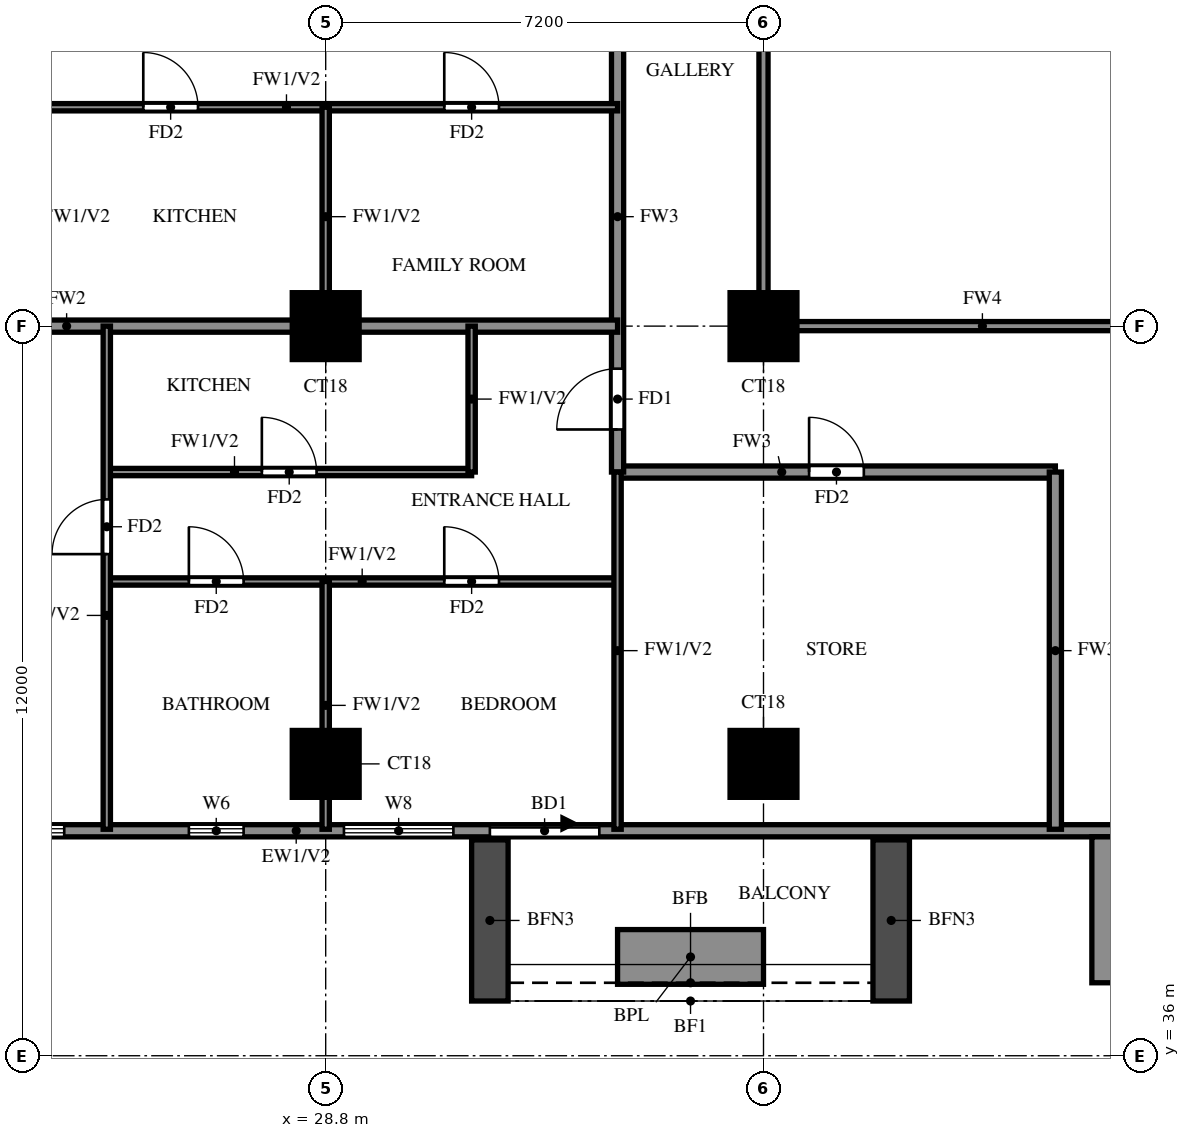
"""IFC4 building model, lengths in metres.
Left out: names, types, materials, properties, quantities, classifications, styles, units other than length and angle.
Written with IfcOpenShell. Run it as: python <this file> out.ifc"""

import sys

from ifc_helpers import new_model, si_unit, direction, frame, frame_2d, origin, origin_2d, place, context, subcontext, project, spatial, rectangle, extrude, source, transform, mapped, element, fill, save


model = new_model("IFC4")
c1 = context("Model", 3, precision=1e-05, world=origin(), true_north=direction((0.0, 1.0)))
c2 = subcontext(c1, "Body", "Model", "MODEL_VIEW")
j1 = project(units=[si_unit("LENGTHUNIT", "METRE"), si_unit("PLANEANGLEUNIT", "RADIAN")], contexts=[c1])
p1 = place(None, origin())
s1 = spatial("IfcSite", under=j1, at=p1, CompositionType="ELEMENT")
p2 = place(p1, origin())
s2 = spatial("IfcBuilding", under=s1, at=p2, CompositionType="ELEMENT")
p3 = place(p2, frame((0.0, 0.0, 130.5)))
s3 = spatial("IfcBuildingStorey", under=s2, at=p3, CompositionType="ELEMENT", Elevation=130.5)
m1 = source(origin(), c2, "Body", "SweptSolid", [
    extrude(rectangle(XDim=1.1, YDim=1.1, at=origin_2d()), origin(), (0.0, 0.0, 1.0), 3.2),
])
for number, where, z_axis, x_axis in (
    (1, (28.8, 40.8, 0.0), (0.0, 0.0, 1.0), (1.0, 0.0, 0.0)),
    (2, (36.0, 40.8, 0.0), (0.0, 0.0, 1.0), (1.0, 0.0, 0.0)),
    (3, (28.8, 48.0, 0.0), (0.0, 0.0, 1.0), (1.0, 0.0, 0.0)),
    (4, (36.0, 48.0, 0.0), (0.0, 0.0, 1.0), (1.0, 0.0, 0.0)),
):
    element("IfcColumn", number, at=place(p3, frame(where, z_axis=z_axis, x_axis=x_axis)), inside=s3, PredefinedType="COLUMN", context=c2, shape_type="MappedRepresentation", body=[
        mapped(m1, transform((0.0, 0.0, 0.0))),
    ])
p4 = place(p3, frame((18.2, 39.7, 0.0), z_axis=(0.0, 0.0, 1.0), x_axis=(1.0, 0.0, 0.0)))
e5 = element("IfcWall", 5, at=p4, inside=s3, PredefinedType="SOLIDWALL", context=c2, shape_type="SweptSolid", body=[
    extrude(rectangle(XDim=23.8, YDim=0.2, at=frame_2d((11.9, 0.0))), origin(), (0.0, 0.0, 1.0), 3.2),
])
p5 = place(p4, frame((13.3, 0.0, 0.0)))
e6 = element("IfcOpeningElement", 6, at=p5, cuts=e5, PredefinedType="OPENING", context=c2, shape_type="SweptSolid", body=[
    extrude(rectangle(XDim=1.8, YDim=2.4, at=frame_2d((0.9, 1.2))), frame((0.0, 0.11, 0.0), z_axis=(0.0, -1.0, 0.0), x_axis=(1.0, 0.0, 0.0)), (0.0, 0.0, 1.0), 0.22),
])
p6 = place(p4, frame((0.9, 0.0, 0.6)))
e7 = element("IfcOpeningElement", 7, at=p6, cuts=e5, PredefinedType="OPENING", context=c2, shape_type="SweptSolid", body=[
    extrude(rectangle(XDim=2.4, YDim=2.4, at=frame_2d((1.2, 1.2))), frame((0.0, 0.11, 0.0), z_axis=(0.0, -1.0, 0.0), x_axis=(1.0, 0.0, 0.0)), (0.0, 0.0, 1.0), 0.22),
])
p7 = place(p4, frame((3.9, 0.0, 0.6)))
e8 = element("IfcOpeningElement", 8, at=p7, cuts=e5, PredefinedType="OPENING", context=c2, shape_type="SweptSolid", body=[
    extrude(rectangle(XDim=2.4, YDim=2.4, at=frame_2d((1.2, 1.2))), frame((0.0, 0.11, 0.0), z_axis=(0.0, -1.0, 0.0), x_axis=(1.0, 0.0, 0.0)), (0.0, 0.0, 1.0), 0.22),
])
p8 = place(p4, frame((8.35, 0.0, 1.5)))
e9 = element("IfcOpeningElement", 9, at=p8, cuts=e5, PredefinedType="OPENING", context=c2, shape_type="SweptSolid", body=[
    extrude(rectangle(XDim=0.9, YDim=0.9, at=frame_2d((0.45, 0.45))), frame((0.0, 0.11, 0.0), z_axis=(0.0, -1.0, 0.0), x_axis=(1.0, 0.0, 0.0)), (0.0, 0.0, 1.0), 0.22),
])
p9 = place(p4, frame((10.9, 0.0, 0.6)))
e10 = element("IfcOpeningElement", 10, at=p9, cuts=e5, PredefinedType="OPENING", context=c2, shape_type="SweptSolid", body=[
    extrude(rectangle(XDim=1.8, YDim=2.4, at=frame_2d((0.9, 1.2))), frame((0.0, 0.11, 0.0), z_axis=(0.0, -1.0, 0.0), x_axis=(1.0, 0.0, 0.0)), (0.0, 0.0, 1.0), 0.22),
])
for number, where, z_axis, x_axis in (
    (11, (31.5, 39.55, 0.0), (0.0, 0.0, 1.0), (0.0, -1.0, 0.0)),
    (12, (38.1, 39.55, 0.0), (0.0, 0.0, 1.0), (0.0, -1.0, 0.0)),
):
    element("IfcWall", number, at=place(p3, frame(where, z_axis=z_axis, x_axis=x_axis)), inside=s3, PredefinedType="SOLIDWALL", context=c2, shape_type="SweptSolid", body=[
        extrude(rectangle(XDim=2.65, YDim=0.6, at=frame_2d((1.325, 0.0))), origin(), (0.0, 0.0, 1.0), 2.85),
    ])
p10 = place(p3, frame((33.6, 37.625, 0.0), z_axis=(0.0, 0.0, 1.0), x_axis=(1.0, 0.0, 0.0)))
e13 = element("IfcWall", 13, at=p10, inside=s3, PredefinedType="SOLIDWALL", context=c2, shape_type="SweptSolid", body=[
    extrude(rectangle(XDim=2.4, YDim=0.9, at=frame_2d((1.2, 0.0))), origin(), (0.0, 0.0, 1.0), 0.9),
])
p11 = place(p3, frame((42.3, 37.2, -0.3), z_axis=(0.0, 0.0, 1.0), x_axis=(0.0, 1.0, 0.0)))
e14 = element("IfcWall", 14, at=p11, inside=s3, PredefinedType="SOLIDWALL", context=c2, shape_type="SweptSolid", body=[
    extrude(rectangle(XDim=2.4, YDim=1.8, at=frame_2d((1.2, 0.0))), origin(), (0.0, 0.0, 1.0), 3.8),
])
p12 = place(p3, frame((33.6, 45.6, 0.0), z_axis=(0.0, 0.0, 1.0), x_axis=(1.0, 0.0, 0.0)))
e15 = element("IfcWall", 15, at=p12, inside=s3, PredefinedType="SOLIDWALL", context=c2, shape_type="SweptSolid", body=[
    extrude(rectangle(XDim=7.2, YDim=0.2, at=frame_2d((3.6, 0.0))), origin(), (0.0, 0.0, 1.0), 3.2),
])
p13 = place(p12, frame((3.15, 0.0, 0.0)))
e16 = element("IfcOpeningElement", 16, at=p13, cuts=e15, PredefinedType="OPENING", context=c2, shape_type="SweptSolid", body=[
    extrude(rectangle(XDim=0.9, YDim=2.1, at=frame_2d((0.45, 1.05))), frame((0.0, 0.11, 0.0), z_axis=(0.0, -1.0, 0.0), x_axis=(1.0, 0.0, 0.0)), (0.0, 0.0, 1.0), 0.22),
])
p14 = place(p3, frame((33.6, 45.6, 0.0), z_axis=(0.0, 0.0, 1.0), x_axis=(0.0, 1.0, 0.0)))
e17 = element("IfcWall", 17, at=p14, inside=s3, PredefinedType="SOLIDWALL", context=c2, shape_type="SweptSolid", body=[
    extrude(rectangle(XDim=8.4, YDim=0.2, at=frame_2d((4.2, 0.0))), origin(), (0.0, 0.0, 1.0), 3.2),
])
p15 = place(p14, frame((0.7, 0.0, 0.0)))
e18 = element("IfcOpeningElement", 18, at=p15, cuts=e17, PredefinedType="OPENING", context=c2, shape_type="SweptSolid", body=[
    extrude(rectangle(XDim=1.0, YDim=2.1, at=frame_2d((0.5, 1.05))), frame((0.0, 0.11, 0.0), z_axis=(0.0, -1.0, 0.0), x_axis=(1.0, 0.0, 0.0)), (0.0, 0.0, 1.0), 0.22),
])
p16 = place(p3, frame((40.8, 39.725, 0.0), z_axis=(0.0, 0.0, 1.0), x_axis=(0.0, 1.0, 0.0)))
e19 = element("IfcWall", 19, at=p16, inside=s3, PredefinedType="SOLIDWALL", context=c2, shape_type="SweptSolid", body=[
    extrude(rectangle(XDim=5.875, YDim=0.2, at=frame_2d((2.938, 0.0))), origin(), (0.0, 0.0, 1.0), 3.2),
])
p17 = place(p3, frame((14.525, 48.0, 0.0), z_axis=(0.0, 0.0, 1.0), x_axis=(1.0, 0.0, 0.0)))
e20 = element("IfcWall", 20, at=p17, inside=s3, PredefinedType="SOLIDWALL", context=c2, shape_type="SweptSolid", body=[
    extrude(rectangle(XDim=19.075, YDim=0.2, at=frame_2d((9.538, 0.0))), origin(), (0.0, 0.0, 1.0), 3.2),
])
p18 = place(p3, frame((25.2, 43.8, 0.0), z_axis=(0.0, 0.0, 1.0), x_axis=(1.0, 0.0, 0.0)))
e21 = element("IfcWall", 21, at=p18, inside=s3, PredefinedType="PARTITIONING", context=c2, shape_type="SweptSolid", body=[
    extrude(rectangle(XDim=8.4, YDim=0.12, at=frame_2d((4.2, 0.0))), origin(), (0.0, 0.0, 1.0), 3.2),
])
p19 = place(p18, frame((1.35, 0.0, 0.0)))
e22 = element("IfcOpeningElement", 22, at=p19, cuts=e21, PredefinedType="OPENING", context=c2, shape_type="SweptSolid", body=[
    extrude(rectangle(XDim=0.9, YDim=2.1, at=frame_2d((0.45, 1.05))), frame((0.0, 0.07, 0.0), z_axis=(0.0, -1.0, 0.0), x_axis=(1.0, 0.0, 0.0)), (0.0, 0.0, 1.0), 0.14),
])
p20 = place(p18, frame((5.55, 0.0, 0.0)))
e23 = element("IfcOpeningElement", 23, at=p20, cuts=e21, PredefinedType="OPENING", context=c2, shape_type="SweptSolid", body=[
    extrude(rectangle(XDim=0.9, YDim=2.1, at=frame_2d((0.45, 1.05))), frame((0.0, 0.07, 0.0), z_axis=(0.0, -1.0, 0.0), x_axis=(1.0, 0.0, 0.0)), (0.0, 0.0, 1.0), 0.14),
])
p21 = place(p3, frame((25.2, 45.6, 0.0), z_axis=(0.0, 0.0, 1.0), x_axis=(1.0, 0.0, 0.0)))
e24 = element("IfcWall", 24, at=p21, inside=s3, PredefinedType="PARTITIONING", context=c2, shape_type="SweptSolid", body=[
    extrude(rectangle(XDim=6.0, YDim=0.12, at=frame_2d((3.0, 0.0))), origin(), (0.0, 0.0, 1.0), 3.2),
])
p22 = place(p21, frame((2.55, 0.0, 0.0)))
e25 = element("IfcOpeningElement", 25, at=p22, cuts=e24, PredefinedType="OPENING", context=c2, shape_type="SweptSolid", body=[
    extrude(rectangle(XDim=0.9, YDim=2.1, at=frame_2d((0.45, 1.05))), frame((0.0, 0.07, 0.0), z_axis=(0.0, -1.0, 0.0), x_axis=(1.0, 0.0, 0.0)), (0.0, 0.0, 1.0), 0.14),
])
p23 = place(p3, frame((23.7, 51.6, 0.0), z_axis=(0.0, 0.0, 1.0), x_axis=(1.0, 0.0, 0.0)))
e26 = element("IfcWall", 26, at=p23, inside=s3, PredefinedType="PARTITIONING", context=c2, shape_type="SweptSolid", body=[
    extrude(rectangle(XDim=9.9, YDim=0.12, at=frame_2d((4.95, 0.0))), origin(), (0.0, 0.0, 1.0), 3.2),
])
p24 = place(p23, frame((2.1, 0.0, 0.0)))
e27 = element("IfcOpeningElement", 27, at=p24, cuts=e26, PredefinedType="OPENING", context=c2, shape_type="SweptSolid", body=[
    extrude(rectangle(XDim=0.9, YDim=2.1, at=frame_2d((0.45, 1.05))), frame((0.0, 0.07, 0.0), z_axis=(0.0, -1.0, 0.0), x_axis=(1.0, 0.0, 0.0)), (0.0, 0.0, 1.0), 0.14),
])
p25 = place(p23, frame((7.05, 0.0, 0.0)))
e28 = element("IfcOpeningElement", 28, at=p25, cuts=e26, PredefinedType="OPENING", context=c2, shape_type="SweptSolid", body=[
    extrude(rectangle(XDim=0.9, YDim=2.1, at=frame_2d((0.45, 1.05))), frame((0.0, 0.07, 0.0), z_axis=(0.0, -1.0, 0.0), x_axis=(1.0, 0.0, 0.0)), (0.0, 0.0, 1.0), 0.14),
])
p26 = place(p3, frame((25.2, 39.725, 0.0), z_axis=(0.0, 0.0, 1.0), x_axis=(0.0, 1.0, 0.0)))
e29 = element("IfcWall", 29, at=p26, inside=s3, PredefinedType="PARTITIONING", context=c2, shape_type="SweptSolid", body=[
    extrude(rectangle(XDim=8.275, YDim=0.12, at=frame_2d((4.137, 0.0))), origin(), (0.0, 0.0, 1.0), 3.2),
])
p27 = place(p26, frame((4.525, 0.0, 0.0)))
e30 = element("IfcOpeningElement", 30, at=p27, cuts=e29, PredefinedType="OPENING", context=c2, shape_type="SweptSolid", body=[
    extrude(rectangle(XDim=0.9, YDim=2.1, at=frame_2d((0.45, 1.05))), frame((0.0, 0.07, 0.0), z_axis=(0.0, -1.0, 0.0), x_axis=(1.0, 0.0, 0.0)), (0.0, 0.0, 1.0), 0.14),
])
p28 = place(p3, frame((28.8, 39.725, 0.0), z_axis=(0.0, 0.0, 1.0), x_axis=(0.0, 1.0, 0.0)))
e31 = element("IfcWall", 31, at=p28, inside=s3, PredefinedType="PARTITIONING", context=c2, shape_type="SweptSolid", body=[
    extrude(rectangle(XDim=4.075, YDim=0.12, at=frame_2d((2.038, 0.0))), origin(), (0.0, 0.0, 1.0), 3.2),
])
p29 = place(p3, frame((28.8, 48.0, 0.0), z_axis=(0.0, 0.0, 1.0), x_axis=(0.0, 1.0, 0.0)))
e32 = element("IfcWall", 32, at=p29, inside=s3, PredefinedType="PARTITIONING", context=c2, shape_type="SweptSolid", body=[
    extrude(rectangle(XDim=3.6, YDim=0.12, at=frame_2d((1.8, 0.0))), origin(), (0.0, 0.0, 1.0), 3.2),
])
p30 = place(p3, frame((31.2, 45.6, 0.0), z_axis=(0.0, 0.0, 1.0), x_axis=(0.0, 1.0, 0.0)))
e33 = element("IfcWall", 33, at=p30, inside=s3, PredefinedType="PARTITIONING", context=c2, shape_type="SweptSolid", body=[
    extrude(rectangle(XDim=2.4, YDim=0.12, at=frame_2d((1.2, 0.0))), origin(), (0.0, 0.0, 1.0), 3.2),
])
p31 = place(p3, frame((33.6, 39.725, 0.0), z_axis=(0.0, 0.0, 1.0), x_axis=(0.0, 1.0, 0.0)))
e34 = element("IfcWall", 34, at=p31, inside=s3, PredefinedType="PARTITIONING", context=c2, shape_type="SweptSolid", body=[
    extrude(rectangle(XDim=5.875, YDim=0.12, at=frame_2d((2.938, 0.0))), origin(), (0.0, 0.0, 1.0), 3.2),
])
p32 = place(p3, frame((36.0, 48.0, 0.0), z_axis=(0.0, 0.0, 1.0), x_axis=(1.0, 0.0, 0.0)))
e35 = element("IfcWall", 35, at=p32, inside=s3, PredefinedType="SOLIDWALL", context=c2, shape_type="SweptSolid", body=[
    extrude(rectangle(XDim=7.2, YDim=0.15, at=frame_2d((3.6, 0.0))), origin(), (0.0, 0.0, 1.0), 2.3),
])
p33 = place(p3, frame((36.0, 48.0, 0.0), z_axis=(0.0, 0.0, 1.0), x_axis=(0.0, 1.0, 0.0)))
e36 = element("IfcWall", 36, at=p33, inside=s3, PredefinedType="SOLIDWALL", context=c2, shape_type="SweptSolid", body=[
    extrude(rectangle(XDim=14.4, YDim=0.15, at=frame_2d((7.2, 0.0))), origin(), (0.0, 0.0, 1.0), 2.3),
])
p34 = place(p5, origin())
e37 = element("IfcDoor", 37, at=p34, inside=s3, OperationType="DOUBLE_DOOR_SLIDING", PredefinedType="DOOR", context=c2, shape_type="SweptSolid", body=[
    extrude(rectangle(XDim=1.8, YDim=2.4, at=frame_2d((0.9, 1.2))), frame((0.0, 0.025, 0.0), z_axis=(0.0, -1.0, 0.0), x_axis=(1.0, 0.0, 0.0)), (0.0, 0.0, 1.0), 0.05),
])
fill(e6, e37)
p35 = place(p7, origin())
e38 = element("IfcWindow", 38, at=p35, inside=s3, PartitioningType="DOUBLE_PANEL_VERTICAL", PredefinedType="WINDOW", context=c2, shape_type="SweptSolid", body=[
    extrude(rectangle(XDim=2.4, YDim=2.4, at=frame_2d((1.2, 1.2))), frame((0.0, 0.03, 0.0), z_axis=(0.0, -1.0, 0.0), x_axis=(1.0, 0.0, 0.0)), (0.0, 0.0, 1.0), 0.06),
])
fill(e8, e38)
p36 = place(p8, origin())
e39 = element("IfcWindow", 39, at=p36, inside=s3, PartitioningType="SINGLE_PANEL", PredefinedType="WINDOW", context=c2, shape_type="SweptSolid", body=[
    extrude(rectangle(XDim=0.9, YDim=0.9, at=frame_2d((0.45, 0.45))), frame((0.0, 0.03, 0.0), z_axis=(0.0, -1.0, 0.0), x_axis=(1.0, 0.0, 0.0)), (0.0, 0.0, 1.0), 0.06),
])
fill(e9, e39)
p37 = place(p9, origin())
e40 = element("IfcWindow", 40, at=p37, inside=s3, PartitioningType="DOUBLE_PANEL_VERTICAL", PredefinedType="WINDOW", context=c2, shape_type="SweptSolid", body=[
    extrude(rectangle(XDim=1.8, YDim=2.4, at=frame_2d((0.9, 1.2))), frame((0.0, 0.03, 0.0), z_axis=(0.0, -1.0, 0.0), x_axis=(1.0, 0.0, 0.0)), (0.0, 0.0, 1.0), 0.06),
])
fill(e10, e40)
p38 = place(p15, origin())
e41 = element("IfcDoor", 41, at=p38, inside=s3, OperationType="SINGLE_SWING_LEFT", PredefinedType="DOOR", context=c2, shape_type="SweptSolid", body=[
    extrude(rectangle(XDim=1.0, YDim=2.1, at=frame_2d((0.5, 1.05))), frame((0.0, 0.025, 0.0), z_axis=(0.0, -1.0, 0.0), x_axis=(1.0, 0.0, 0.0)), (0.0, 0.0, 1.0), 0.05),
])
fill(e18, e41)
p39 = place(p27, origin())
e42 = element("IfcDoor", 42, at=p39, inside=s3, OperationType="SINGLE_SWING_LEFT", PredefinedType="DOOR", context=c2, shape_type="SweptSolid", body=[
    extrude(rectangle(XDim=0.9, YDim=2.1, at=frame_2d((0.45, 1.05))), frame((0.0, 0.025, 0.0), z_axis=(0.0, -1.0, 0.0), x_axis=(1.0, 0.0, 0.0)), (0.0, 0.0, 1.0), 0.05),
])
fill(e30, e42)
p40 = place(p19, origin())
e43 = element("IfcDoor", 43, at=p40, inside=s3, OperationType="SINGLE_SWING_RIGHT", PredefinedType="DOOR", context=c2, shape_type="SweptSolid", body=[
    extrude(rectangle(XDim=0.9, YDim=2.1, at=frame_2d((0.45, 1.05))), frame((0.0, 0.025, 0.0), z_axis=(0.0, -1.0, 0.0), x_axis=(1.0, 0.0, 0.0)), (0.0, 0.0, 1.0), 0.05),
])
fill(e22, e43)
p41 = place(p20, origin())
e44 = element("IfcDoor", 44, at=p41, inside=s3, OperationType="SINGLE_SWING_LEFT", PredefinedType="DOOR", context=c2, shape_type="SweptSolid", body=[
    extrude(rectangle(XDim=0.9, YDim=2.1, at=frame_2d((0.45, 1.05))), frame((0.0, 0.025, 0.0), z_axis=(0.0, -1.0, 0.0), x_axis=(1.0, 0.0, 0.0)), (0.0, 0.0, 1.0), 0.05),
])
fill(e23, e44)
p42 = place(p22, origin())
e45 = element("IfcDoor", 45, at=p42, inside=s3, OperationType="SINGLE_SWING_LEFT", PredefinedType="DOOR", context=c2, shape_type="SweptSolid", body=[
    extrude(rectangle(XDim=0.9, YDim=2.1, at=frame_2d((0.45, 1.05))), frame((0.0, 0.025, 0.0), z_axis=(0.0, -1.0, 0.0), x_axis=(1.0, 0.0, 0.0)), (0.0, 0.0, 1.0), 0.05),
])
fill(e25, e45)
p43 = place(p13, origin())
e46 = element("IfcDoor", 46, at=p43, inside=s3, OperationType="SINGLE_SWING_RIGHT", PredefinedType="DOOR", context=c2, shape_type="SweptSolid", body=[
    extrude(rectangle(XDim=0.9, YDim=2.1, at=frame_2d((0.45, 1.05))), frame((0.0, 0.025, 0.0), z_axis=(0.0, -1.0, 0.0), x_axis=(1.0, 0.0, 0.0)), (0.0, 0.0, 1.0), 0.05),
])
fill(e16, e46)
p44 = place(p24, origin())
e47 = element("IfcDoor", 47, at=p44, inside=s3, OperationType="SINGLE_SWING_LEFT", PredefinedType="DOOR", context=c2, shape_type="SweptSolid", body=[
    extrude(rectangle(XDim=0.9, YDim=2.1, at=frame_2d((0.45, 1.05))), frame((0.0, 0.025, 0.0), z_axis=(0.0, -1.0, 0.0), x_axis=(1.0, 0.0, 0.0)), (0.0, 0.0, 1.0), 0.05),
])
fill(e27, e47)
p45 = place(p25, origin())
e48 = element("IfcDoor", 48, at=p45, inside=s3, OperationType="SINGLE_SWING_RIGHT", PredefinedType="DOOR", context=c2, shape_type="SweptSolid", body=[
    extrude(rectangle(XDim=0.9, YDim=2.1, at=frame_2d((0.45, 1.05))), frame((0.0, 0.025, 0.0), z_axis=(0.0, -1.0, 0.0), x_axis=(1.0, 0.0, 0.0)), (0.0, 0.0, 1.0), 0.05),
])
fill(e28, e48)
save(model, sys.argv[1])
